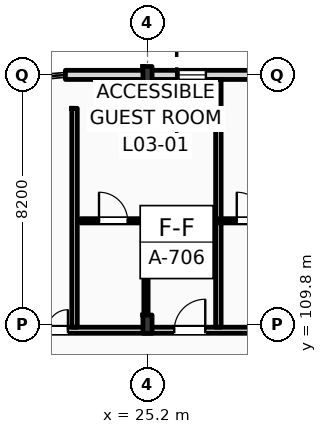
"""IFC4 building model, lengths in metres.
Left out: names, types, materials, properties, quantities, classifications, styles, units other than length and angle.
Written with IfcOpenShell. Run it as: python <this file> out.ifc"""

import sys

from ifc_helpers import new_model, si_unit, direction, frame, frame_2d, origin, origin_2d, place, context, subcontext, project, spatial, rectangle, i_section, extrude, element, fill, save


model = new_model("IFC4")
c1 = context("Model", 3, precision=1e-05, world=origin(), true_north=direction((0.0, 1.0)))
c2 = subcontext(c1, "Body", "Model", "MODEL_VIEW")
j1 = project(units=[si_unit("LENGTHUNIT", "METRE"), si_unit("PLANEANGLEUNIT", "RADIAN")], contexts=[c1])
p1 = place(None, origin())
s1 = spatial("IfcSite", under=j1, at=p1, CompositionType="ELEMENT")
p2 = place(p1, origin())
s2 = spatial("IfcBuilding", under=s1, at=p2, CompositionType="ELEMENT")
p3 = place(p2, frame((0.0, 0.0, 16.2)))
s3 = spatial("IfcBuildingStorey", under=s2, at=p3, CompositionType="ELEMENT", Elevation=16.2)
p4 = place(p3, frame((25.2, 109.8, 0.0), z_axis=(0.0, 0.0, 1.0), x_axis=(1.0, 0.0, 0.0)))
e1 = element("IfcColumn", 1, at=p4, inside=s3, PredefinedType="COLUMN", context=c2, shape_type="SweptSolid", body=[
    extrude(i_section(OverallWidth=0.3, OverallDepth=0.6, WebThickness=0.015, FlangeThickness=0.03, FilletRadius=0.027, at=origin_2d()), origin(), (0.0, 0.0, 1.0), 4.2),
])
p5 = place(p3, frame((25.2, 118.0, 0.0), z_axis=(0.0, 0.0, 1.0), x_axis=(1.0, 0.0, 0.0)))
e2 = element("IfcColumn", 2, at=p5, inside=s3, PredefinedType="COLUMN", context=c2, shape_type="SweptSolid", body=[
    extrude(i_section(OverallWidth=0.3, OverallDepth=0.55, WebThickness=0.015, FlangeThickness=0.029, FilletRadius=0.027, at=origin_2d()), origin(), (0.0, 0.0, 1.0), 4.2),
])
p6 = place(p3, frame((22.5, 118.0, 0.0), z_axis=(0.0, 0.0, 1.0), x_axis=(1.0, 0.0, 0.0)))
e3 = element("IfcWall", 3, at=p6, inside=s3, PredefinedType="STANDARD", context=c2, shape_type="SweptSolid", body=[
    extrude(rectangle(XDim=97.5, YDim=0.3, at=frame_2d((48.75, 0.0))), origin(), (0.0, 0.0, 1.0), 3.36),
])
p7 = place(p6, frame((3.721, 0.0, 0.9)))
e4 = element("IfcOpeningElement", 4, at=p7, cuts=e3, PredefinedType="OPENING", context=c2, shape_type="SweptSolid", body=[
    extrude(rectangle(XDim=0.9, YDim=1.8, at=frame_2d((0.45, 0.9))), frame((0.0, 0.16, 0.0), z_axis=(0.0, -1.0, 0.0), x_axis=(1.0, 0.0, 0.0)), (0.0, 0.0, 1.0), 0.32),
])
p8 = place(p6, frame((6.447, 0.0, 0.9)))
e5 = element("IfcOpeningElement", 5, at=p8, cuts=e3, PredefinedType="OPENING", context=c2, shape_type="SweptSolid", body=[
    extrude(rectangle(XDim=1.35, YDim=1.85, at=frame_2d((0.675, 0.925))), frame((0.0, 0.16, 0.0), z_axis=(0.0, -1.0, 0.0), x_axis=(1.0, 0.0, 0.0)), (0.0, 0.0, 1.0), 0.32),
])
p9 = place(p6, frame((11.363, 0.0, 0.9)))
e6 = element("IfcOpeningElement", 6, at=p9, cuts=e3, PredefinedType="OPENING", context=c2, shape_type="SweptSolid", body=[
    extrude(rectangle(XDim=1.5, YDim=1.9, at=frame_2d((0.75, 0.95))), frame((0.0, 0.16, 0.0), z_axis=(0.0, -1.0, 0.0), x_axis=(1.0, 0.0, 0.0)), (0.0, 0.0, 1.0), 0.32),
])
p10 = place(p6, frame((15.078, 0.0, 0.9)))
e7 = element("IfcOpeningElement", 7, at=p10, cuts=e3, PredefinedType="OPENING", context=c2, shape_type="SweptSolid", body=[
    extrude(rectangle(XDim=1.65, YDim=1.95, at=frame_2d((0.825, 0.975))), frame((0.0, 0.16, 0.0), z_axis=(0.0, -1.0, 0.0), x_axis=(1.0, 0.0, 0.0)), (0.0, 0.0, 1.0), 0.32),
])
p11 = place(p6, frame((19.395, 0.0, 0.9)))
e8 = element("IfcOpeningElement", 8, at=p11, cuts=e3, PredefinedType="OPENING", context=c2, shape_type="SweptSolid", body=[
    extrude(rectangle(XDim=1.8, YDim=2.0, at=frame_2d((0.9, 1.0))), frame((0.0, 0.16, 0.0), z_axis=(0.0, -1.0, 0.0), x_axis=(1.0, 0.0, 0.0)), (0.0, 0.0, 1.0), 0.32),
])
p12 = place(p6, frame((23.31, 0.0, 0.9)))
e9 = element("IfcOpeningElement", 9, at=p12, cuts=e3, PredefinedType="OPENING", context=c2, shape_type="SweptSolid", body=[
    extrude(rectangle(XDim=1.95, YDim=2.05, at=frame_2d((0.975, 1.025))), frame((0.0, 0.16, 0.0), z_axis=(0.0, -1.0, 0.0), x_axis=(1.0, 0.0, 0.0)), (0.0, 0.0, 1.0), 0.32),
])
p13 = place(p6, frame((28.026, 0.0, 0.9)))
e10 = element("IfcOpeningElement", 10, at=p13, cuts=e3, PredefinedType="OPENING", context=c2, shape_type="SweptSolid", body=[
    extrude(rectangle(XDim=2.1, YDim=2.1, at=frame_2d((1.05, 1.05))), frame((0.0, 0.16, 0.0), z_axis=(0.0, -1.0, 0.0), x_axis=(1.0, 0.0, 0.0)), (0.0, 0.0, 1.0), 0.32),
])
p14 = place(p6, frame((31.941, 0.0, 0.9)))
e11 = element("IfcOpeningElement", 11, at=p14, cuts=e3, PredefinedType="OPENING", context=c2, shape_type="SweptSolid", body=[
    extrude(rectangle(XDim=1.1, YDim=2.15, at=frame_2d((0.55, 1.075))), frame((0.0, 0.16, 0.0), z_axis=(0.0, -1.0, 0.0), x_axis=(1.0, 0.0, 0.0)), (0.0, 0.0, 1.0), 0.32),
])
p15 = place(p6, frame((36.657, 0.0, 0.9)))
e12 = element("IfcOpeningElement", 12, at=p15, cuts=e3, PredefinedType="OPENING", context=c2, shape_type="SweptSolid", body=[
    extrude(rectangle(XDim=2.4, YDim=2.2, at=frame_2d((1.2, 1.1))), frame((0.0, 0.16, 0.0), z_axis=(0.0, -1.0, 0.0), x_axis=(1.0, 0.0, 0.0)), (0.0, 0.0, 1.0), 0.32),
])
p16 = place(p6, frame((42.574, 0.0, 0.9)))
e13 = element("IfcOpeningElement", 13, at=p16, cuts=e3, PredefinedType="OPENING", context=c2, shape_type="SweptSolid", body=[
    extrude(rectangle(XDim=1.35, YDim=2.25, at=frame_2d((0.675, 1.125))), frame((0.0, 0.16, 0.0), z_axis=(0.0, -1.0, 0.0), x_axis=(1.0, 0.0, 0.0)), (0.0, 0.0, 1.0), 0.32),
])
p17 = place(p6, frame((45.289, 0.0, 0.9)))
e14 = element("IfcOpeningElement", 14, at=p17, cuts=e3, PredefinedType="OPENING", context=c2, shape_type="SweptSolid", body=[
    extrude(rectangle(XDim=2.7, YDim=2.28, at=frame_2d((1.35, 1.14))), frame((0.0, 0.16, 0.0), z_axis=(0.0, -1.0, 0.0), x_axis=(1.0, 0.0, 0.0)), (0.0, 0.0, 1.0), 0.32),
])
p18 = place(p6, frame((50.406, 0.0, 0.9)))
e15 = element("IfcOpeningElement", 15, at=p18, cuts=e3, PredefinedType="OPENING", context=c2, shape_type="SweptSolid", body=[
    extrude(rectangle(XDim=1.8, YDim=2.28, at=frame_2d((0.9, 1.14))), frame((0.0, 0.16, 0.0), z_axis=(0.0, -1.0, 0.0), x_axis=(1.0, 0.0, 0.0)), (0.0, 0.0, 1.0), 0.32),
])
p19 = place(p6, frame((53.922, 0.0, 0.9)))
e16 = element("IfcOpeningElement", 16, at=p19, cuts=e3, PredefinedType="OPENING", context=c2, shape_type="SweptSolid", body=[
    extrude(rectangle(XDim=1.8, YDim=2.28, at=frame_2d((0.9, 1.14))), frame((0.0, 0.16, 0.0), z_axis=(0.0, -1.0, 0.0), x_axis=(1.0, 0.0, 0.0)), (0.0, 0.0, 1.0), 0.32),
])
p20 = place(p6, frame((58.332, 0.0, 0.9)))
e17 = element("IfcOpeningElement", 17, at=p20, cuts=e3, PredefinedType="OPENING", context=c2, shape_type="SweptSolid", body=[
    extrude(rectangle(XDim=2.961, YDim=2.28, at=frame_2d((1.48, 1.14))), frame((0.0, 0.16, 0.0), z_axis=(0.0, -1.0, 0.0), x_axis=(1.0, 0.0, 0.0)), (0.0, 0.0, 1.0), 0.32),
])
p21 = place(p6, frame((62.513, 0.0, 0.9)))
e18 = element("IfcOpeningElement", 18, at=p21, cuts=e3, PredefinedType="OPENING", context=c2, shape_type="SweptSolid", body=[
    extrude(rectangle(XDim=1.8, YDim=2.28, at=frame_2d((0.9, 1.14))), frame((0.0, 0.16, 0.0), z_axis=(0.0, -1.0, 0.0), x_axis=(1.0, 0.0, 0.0)), (0.0, 0.0, 1.0), 0.32),
])
p22 = place(p6, frame((67.114, 0.0, 0.9)))
e19 = element("IfcOpeningElement", 19, at=p22, cuts=e3, PredefinedType="OPENING", context=c2, shape_type="SweptSolid", body=[
    extrude(rectangle(XDim=2.961, YDim=2.28, at=frame_2d((1.48, 1.14))), frame((0.0, 0.16, 0.0), z_axis=(0.0, -1.0, 0.0), x_axis=(1.0, 0.0, 0.0)), (0.0, 0.0, 1.0), 0.32),
])
p23 = place(p6, frame((73.695, 0.0, 0.9)))
e20 = element("IfcOpeningElement", 20, at=p23, cuts=e3, PredefinedType="OPENING", context=c2, shape_type="SweptSolid", body=[
    extrude(rectangle(XDim=1.1, YDim=2.28, at=frame_2d((0.55, 1.14))), frame((0.0, 0.16, 0.0), z_axis=(0.0, -1.0, 0.0), x_axis=(1.0, 0.0, 0.0)), (0.0, 0.0, 1.0), 0.32),
])
p24 = place(p6, frame((75.895, 0.0, 0.9)))
e21 = element("IfcOpeningElement", 21, at=p24, cuts=e3, PredefinedType="OPENING", context=c2, shape_type="SweptSolid", body=[
    extrude(rectangle(XDim=2.961, YDim=2.28, at=frame_2d((1.48, 1.14))), frame((0.0, 0.16, 0.0), z_axis=(0.0, -1.0, 0.0), x_axis=(1.0, 0.0, 0.0)), (0.0, 0.0, 1.0), 0.32),
])
p25 = place(p6, frame((81.676, 0.0, 0.9)))
e22 = element("IfcOpeningElement", 22, at=p25, cuts=e3, PredefinedType="OPENING", context=c2, shape_type="SweptSolid", body=[
    extrude(rectangle(XDim=1.8, YDim=2.28, at=frame_2d((0.9, 1.14))), frame((0.0, 0.16, 0.0), z_axis=(0.0, -1.0, 0.0), x_axis=(1.0, 0.0, 0.0)), (0.0, 0.0, 1.0), 0.32),
])
p26 = place(p6, frame((84.677, 0.0, 0.9)))
e23 = element("IfcOpeningElement", 23, at=p26, cuts=e3, PredefinedType="OPENING", context=c2, shape_type="SweptSolid", body=[
    extrude(rectangle(XDim=2.961, YDim=2.28, at=frame_2d((1.48, 1.14))), frame((0.0, 0.16, 0.0), z_axis=(0.0, -1.0, 0.0), x_axis=(1.0, 0.0, 0.0)), (0.0, 0.0, 1.0), 0.32),
])
p27 = place(p6, frame((89.999, 0.0, 0.9)))
e24 = element("IfcOpeningElement", 24, at=p27, cuts=e3, PredefinedType="OPENING", context=c2, shape_type="SweptSolid", body=[
    extrude(rectangle(XDim=1.1, YDim=1.5, at=frame_2d((0.55, 0.75))), frame((0.0, 0.16, 0.0), z_axis=(0.0, -1.0, 0.0), x_axis=(1.0, 0.0, 0.0)), (0.0, 0.0, 1.0), 0.32),
])
p28 = place(p6, frame((94.35, 0.0, 0.9)))
e25 = element("IfcOpeningElement", 25, at=p28, cuts=e3, PredefinedType="OPENING", context=c2, shape_type="SweptSolid", body=[
    extrude(rectangle(XDim=1.25, YDim=1.6, at=frame_2d((0.625, 0.8))), frame((0.0, 0.16, 0.0), z_axis=(0.0, -1.0, 0.0), x_axis=(1.0, 0.0, 0.0)), (0.0, 0.0, 1.0), 0.32),
])
p29 = place(p3, frame((10.65, 109.6, 0.0), z_axis=(0.0, 0.0, 1.0), x_axis=(1.0, 0.0, 0.0)))
e26 = element("IfcWall", 26, at=p29, inside=s3, PredefinedType="PARTITIONING", context=c2, shape_type="SweptSolid", body=[
    extrude(rectangle(XDim=109.21, YDim=0.2, at=frame_2d((54.605, 0.0))), origin(), (0.0, 0.0, 1.0), 3.36),
])
p30 = place(p29, frame((15.43, 0.0, 0.0)))
e27 = element("IfcOpeningElement", 27, at=p30, cuts=e26, PredefinedType="OPENING", context=c2, shape_type="SweptSolid", body=[
    extrude(rectangle(XDim=1.02, YDim=2.2, at=frame_2d((0.51, 1.1))), frame((0.0, 0.11, 0.0), z_axis=(0.0, -1.0, 0.0), x_axis=(1.0, 0.0, 0.0)), (0.0, 0.0, 1.0), 0.22),
])
p31 = place(p29, frame((19.537, 0.0, 0.0)))
e28 = element("IfcOpeningElement", 28, at=p31, cuts=e26, PredefinedType="OPENING", context=c2, shape_type="SweptSolid", body=[
    extrude(rectangle(XDim=1.02, YDim=2.2, at=frame_2d((0.51, 1.1))), frame((0.0, 0.11, 0.0), z_axis=(0.0, -1.0, 0.0), x_axis=(1.0, 0.0, 0.0)), (0.0, 0.0, 1.0), 0.22),
])
p32 = place(p29, frame((23.928, 0.0, 0.0)))
e29 = element("IfcOpeningElement", 29, at=p32, cuts=e26, PredefinedType="OPENING", context=c2, shape_type="SweptSolid", body=[
    extrude(rectangle(XDim=1.02, YDim=2.2, at=frame_2d((0.51, 1.1))), frame((0.0, 0.11, 0.0), z_axis=(0.0, -1.0, 0.0), x_axis=(1.0, 0.0, 0.0)), (0.0, 0.0, 1.0), 0.22),
])
p33 = place(p29, frame((26.169, 0.0, 0.0)))
e30 = element("IfcOpeningElement", 30, at=p33, cuts=e26, PredefinedType="OPENING", context=c2, shape_type="SweptSolid", body=[
    extrude(rectangle(XDim=1.02, YDim=2.2, at=frame_2d((0.51, 1.1))), frame((0.0, 0.11, 0.0), z_axis=(0.0, -1.0, 0.0), x_axis=(1.0, 0.0, 0.0)), (0.0, 0.0, 1.0), 0.22),
])
p34 = place(p29, frame((32.739, 0.0, 0.0)))
e31 = element("IfcOpeningElement", 31, at=p34, cuts=e26, PredefinedType="OPENING", context=c2, shape_type="SweptSolid", body=[
    extrude(rectangle(XDim=0.96, YDim=2.2, at=frame_2d((0.48, 1.1))), frame((0.0, 0.11, 0.0), z_axis=(0.0, -1.0, 0.0), x_axis=(1.0, 0.0, 0.0)), (0.0, 0.0, 1.0), 0.22),
])
p35 = place(p29, frame((34.98, 0.0, 0.0)))
e32 = element("IfcOpeningElement", 32, at=p35, cuts=e26, PredefinedType="OPENING", context=c2, shape_type="SweptSolid", body=[
    extrude(rectangle(XDim=0.96, YDim=2.2, at=frame_2d((0.48, 1.1))), frame((0.0, 0.11, 0.0), z_axis=(0.0, -1.0, 0.0), x_axis=(1.0, 0.0, 0.0)), (0.0, 0.0, 1.0), 0.22),
])
p36 = place(p29, frame((41.521, 0.0, 0.0)))
e33 = element("IfcOpeningElement", 33, at=p36, cuts=e26, PredefinedType="OPENING", context=c2, shape_type="SweptSolid", body=[
    extrude(rectangle(XDim=0.96, YDim=2.2, at=frame_2d((0.48, 1.1))), frame((0.0, 0.11, 0.0), z_axis=(0.0, -1.0, 0.0), x_axis=(1.0, 0.0, 0.0)), (0.0, 0.0, 1.0), 0.22),
])
p37 = place(p29, frame((43.512, 0.0, 0.0)))
e34 = element("IfcOpeningElement", 34, at=p37, cuts=e26, PredefinedType="OPENING", context=c2, shape_type="SweptSolid", body=[
    extrude(rectangle(XDim=0.96, YDim=2.2, at=frame_2d((0.48, 1.1))), frame((0.0, 0.11, 0.0), z_axis=(0.0, -1.0, 0.0), x_axis=(1.0, 0.0, 0.0)), (0.0, 0.0, 1.0), 0.22),
])
p38 = place(p29, frame((50.303, 0.0, 0.0)))
e35 = element("IfcOpeningElement", 35, at=p38, cuts=e26, PredefinedType="OPENING", context=c2, shape_type="SweptSolid", body=[
    extrude(rectangle(XDim=0.96, YDim=2.2, at=frame_2d((0.48, 1.1))), frame((0.0, 0.11, 0.0), z_axis=(0.0, -1.0, 0.0), x_axis=(1.0, 0.0, 0.0)), (0.0, 0.0, 1.0), 0.22),
])
p39 = place(p29, frame((54.944, 0.0, 0.0)))
e36 = element("IfcOpeningElement", 36, at=p39, cuts=e26, PredefinedType="OPENING", context=c2, shape_type="SweptSolid", body=[
    extrude(rectangle(XDim=0.96, YDim=2.2, at=frame_2d((0.48, 1.1))), frame((0.0, 0.11, 0.0), z_axis=(0.0, -1.0, 0.0), x_axis=(1.0, 0.0, 0.0)), (0.0, 0.0, 1.0), 0.22),
])
p40 = place(p29, frame((59.085, 0.0, 0.0)))
e37 = element("IfcOpeningElement", 37, at=p40, cuts=e26, PredefinedType="OPENING", context=c2, shape_type="SweptSolid", body=[
    extrude(rectangle(XDim=0.96, YDim=2.2, at=frame_2d((0.48, 1.1))), frame((0.0, 0.11, 0.0), z_axis=(0.0, -1.0, 0.0), x_axis=(1.0, 0.0, 0.0)), (0.0, 0.0, 1.0), 0.22),
])
p41 = place(p29, frame((63.476, 0.0, 0.0)))
e38 = element("IfcOpeningElement", 38, at=p41, cuts=e26, PredefinedType="OPENING", context=c2, shape_type="SweptSolid", body=[
    extrude(rectangle(XDim=0.96, YDim=2.2, at=frame_2d((0.48, 1.1))), frame((0.0, 0.11, 0.0), z_axis=(0.0, -1.0, 0.0), x_axis=(1.0, 0.0, 0.0)), (0.0, 0.0, 1.0), 0.22),
])
p42 = place(p29, frame((65.716, 0.0, 0.0)))
e39 = element("IfcOpeningElement", 39, at=p42, cuts=e26, PredefinedType="OPENING", context=c2, shape_type="SweptSolid", body=[
    extrude(rectangle(XDim=0.96, YDim=2.2, at=frame_2d((0.48, 1.1))), frame((0.0, 0.11, 0.0), z_axis=(0.0, -1.0, 0.0), x_axis=(1.0, 0.0, 0.0)), (0.0, 0.0, 1.0), 0.22),
])
p43 = place(p29, frame((72.257, 0.0, 0.0)))
e40 = element("IfcOpeningElement", 40, at=p43, cuts=e26, PredefinedType="OPENING", context=c2, shape_type="SweptSolid", body=[
    extrude(rectangle(XDim=0.96, YDim=2.2, at=frame_2d((0.48, 1.1))), frame((0.0, 0.11, 0.0), z_axis=(0.0, -1.0, 0.0), x_axis=(1.0, 0.0, 0.0)), (0.0, 0.0, 1.0), 0.22),
])
p44 = place(p29, frame((74.498, 0.0, 0.0)))
e41 = element("IfcOpeningElement", 41, at=p44, cuts=e26, PredefinedType="OPENING", context=c2, shape_type="SweptSolid", body=[
    extrude(rectangle(XDim=0.96, YDim=2.2, at=frame_2d((0.48, 1.1))), frame((0.0, 0.11, 0.0), z_axis=(0.0, -1.0, 0.0), x_axis=(1.0, 0.0, 0.0)), (0.0, 0.0, 1.0), 0.22),
])
p45 = place(p29, frame((81.039, 0.0, 0.0)))
e42 = element("IfcOpeningElement", 42, at=p45, cuts=e26, PredefinedType="OPENING", context=c2, shape_type="SweptSolid", body=[
    extrude(rectangle(XDim=0.96, YDim=2.2, at=frame_2d((0.48, 1.1))), frame((0.0, 0.11, 0.0), z_axis=(0.0, -1.0, 0.0), x_axis=(1.0, 0.0, 0.0)), (0.0, 0.0, 1.0), 0.22),
])
p46 = place(p29, frame((85.68, 0.0, 0.0)))
e43 = element("IfcOpeningElement", 43, at=p46, cuts=e26, PredefinedType="OPENING", context=c2, shape_type="SweptSolid", body=[
    extrude(rectangle(XDim=0.96, YDim=2.2, at=frame_2d((0.48, 1.1))), frame((0.0, 0.11, 0.0), z_axis=(0.0, -1.0, 0.0), x_axis=(1.0, 0.0, 0.0)), (0.0, 0.0, 1.0), 0.22),
])
p47 = place(p29, frame((89.82, 0.0, 0.0)))
e44 = element("IfcOpeningElement", 44, at=p47, cuts=e26, PredefinedType="OPENING", context=c2, shape_type="SweptSolid", body=[
    extrude(rectangle(XDim=0.96, YDim=2.2, at=frame_2d((0.48, 1.1))), frame((0.0, 0.11, 0.0), z_axis=(0.0, -1.0, 0.0), x_axis=(1.0, 0.0, 0.0)), (0.0, 0.0, 1.0), 0.22),
])
p48 = place(p29, frame((94.211, 0.0, 0.0)))
e45 = element("IfcOpeningElement", 45, at=p48, cuts=e26, PredefinedType="OPENING", context=c2, shape_type="SweptSolid", body=[
    extrude(rectangle(XDim=0.96, YDim=2.2, at=frame_2d((0.48, 1.1))), frame((0.0, 0.11, 0.0), z_axis=(0.0, -1.0, 0.0), x_axis=(1.0, 0.0, 0.0)), (0.0, 0.0, 1.0), 0.22),
])
p49 = place(p29, frame((98.602, 0.0, 0.0)))
e46 = element("IfcOpeningElement", 46, at=p49, cuts=e26, PredefinedType="OPENING", context=c2, shape_type="SweptSolid", body=[
    extrude(rectangle(XDim=0.96, YDim=2.2, at=frame_2d((0.48, 1.1))), frame((0.0, 0.11, 0.0), z_axis=(0.0, -1.0, 0.0), x_axis=(1.0, 0.0, 0.0)), (0.0, 0.0, 1.0), 0.22),
])
p50 = place(p29, frame((102.993, 0.0, 0.0)))
e47 = element("IfcOpeningElement", 47, at=p50, cuts=e26, PredefinedType="OPENING", context=c2, shape_type="SweptSolid", body=[
    extrude(rectangle(XDim=0.96, YDim=2.2, at=frame_2d((0.48, 1.1))), frame((0.0, 0.11, 0.0), z_axis=(0.0, -1.0, 0.0), x_axis=(1.0, 0.0, 0.0)), (0.0, 0.0, 1.0), 0.22),
])
p51 = place(p29, frame((105.269, 0.0, 0.0)))
e48 = element("IfcOpeningElement", 48, at=p51, cuts=e26, PredefinedType="OPENING", context=c2, shape_type="SweptSolid", body=[
    extrude(rectangle(XDim=0.96, YDim=2.2, at=frame_2d((0.48, 1.1))), frame((0.0, 0.11, 0.0), z_axis=(0.0, -1.0, 0.0), x_axis=(1.0, 0.0, 0.0)), (0.0, 0.0, 1.0), 0.22),
])
p52 = place(p29, frame((2.716, 0.0, 0.0)))
e49 = element("IfcOpeningElement", 49, at=p52, cuts=e26, PredefinedType="OPENING", context=c2, shape_type="SweptSolid", body=[
    extrude(rectangle(XDim=1.35, YDim=2.25, at=frame_2d((0.675, 1.125))), frame((0.0, 0.11, 0.0), z_axis=(0.0, -1.0, 0.0), x_axis=(1.0, 0.0, 0.0)), (0.0, 0.0, 1.0), 0.22),
])
p53 = place(p29, frame((6.65, 0.0, 0.0)))
e50 = element("IfcOpeningElement", 50, at=p53, cuts=e26, PredefinedType="OPENING", context=c2, shape_type="SweptSolid", body=[
    extrude(rectangle(XDim=1.35, YDim=2.25, at=frame_2d((0.675, 1.125))), frame((0.0, 0.11, 0.0), z_axis=(0.0, -1.0, 0.0), x_axis=(1.0, 0.0, 0.0)), (0.0, 0.0, 1.0), 0.22),
])
p54 = place(p29, frame((10.583, 0.0, 0.0)))
e51 = element("IfcOpeningElement", 51, at=p54, cuts=e26, PredefinedType="OPENING", context=c2, shape_type="SweptSolid", body=[
    extrude(rectangle(XDim=1.35, YDim=2.25, at=frame_2d((0.675, 1.125))), frame((0.0, 0.11, 0.0), z_axis=(0.0, -1.0, 0.0), x_axis=(1.0, 0.0, 0.0)), (0.0, 0.0, 1.0), 0.22),
])
p55 = place(p3, frame((27.531, 109.7, 0.0), z_axis=(0.0, 0.0, 1.0), x_axis=(0.0, 1.0, 0.0)))
e52 = element("IfcWall", 52, at=p55, inside=s3, PredefinedType="PARTITIONING", context=c2, shape_type="SweptSolid", body=[
    extrude(rectangle(XDim=8.15, YDim=0.18, at=frame_2d((4.075, 0.0))), origin(), (0.0, 0.0, 1.0), 3.92),
])
p56 = place(p3, frame((25.15, 109.7, 0.0), z_axis=(0.0, 0.0, 1.0), x_axis=(0.0, 1.0, 0.0)))
e53 = element("IfcWall", 53, at=p56, inside=s3, PredefinedType="PARTITIONING", context=c2, shape_type="SweptSolid", body=[
    extrude(rectangle(XDim=3.5, YDim=0.14, at=frame_2d((1.75, 0.0))), origin(), (0.0, 0.0, 1.0), 3.51),
])
p57 = place(p3, frame((23.0, 113.2, 0.0), z_axis=(0.0, 0.0, 1.0), x_axis=(1.0, 0.0, 0.0)))
e54 = element("IfcWall", 54, at=p57, inside=s3, PredefinedType="PARTITIONING", context=c2, shape_type="SweptSolid", body=[
    extrude(rectangle(XDim=2.15, YDim=0.14, at=frame_2d((1.075, 0.0))), origin(), (0.0, 0.0, 1.0), 3.92),
])
p58 = place(p57, frame((0.605, 0.0, 0.0)))
e55 = element("IfcOpeningElement", 55, at=p58, cuts=e54, PredefinedType="OPENING", context=c2, shape_type="SweptSolid", body=[
    extrude(rectangle(XDim=0.94, YDim=2.15, at=frame_2d((0.47, 1.075))), frame((0.0, 0.08, 0.0), z_axis=(0.0, -1.0, 0.0), x_axis=(1.0, 0.0, 0.0)), (0.0, 0.0, 1.0), 0.16),
])
p59 = place(p3, frame((27.531, 113.2, 0.0), z_axis=(0.0, 0.0, 1.0), x_axis=(1.0, 0.0, 0.0)))
e56 = element("IfcWall", 56, at=p59, inside=s3, PredefinedType="PARTITIONING", context=c2, shape_type="SweptSolid", body=[
    extrude(rectangle(XDim=2.15, YDim=0.14, at=frame_2d((1.075, 0.0))), origin(), (0.0, 0.0, 1.0), 3.92),
])
p60 = place(p59, frame((0.605, 0.0, 0.0)))
e57 = element("IfcOpeningElement", 57, at=p60, cuts=e56, PredefinedType="OPENING", context=c2, shape_type="SweptSolid", body=[
    extrude(rectangle(XDim=0.94, YDim=2.15, at=frame_2d((0.47, 1.075))), frame((0.0, 0.08, 0.0), z_axis=(0.0, -1.0, 0.0), x_axis=(1.0, 0.0, 0.0)), (0.0, 0.0, 1.0), 0.16),
])
p61 = place(p3, frame((22.8, 109.7, 0.0), z_axis=(0.0, 0.0, 1.0), x_axis=(0.0, 1.0, 0.0)))
e58 = element("IfcWall", 58, at=p61, inside=s3, PredefinedType="PARTITIONING", context=c2, shape_type="SweptSolid", body=[
    extrude(rectangle(XDim=7.2, YDim=0.18, at=frame_2d((3.6, 0.0))), origin(), (0.0, 0.0, 1.0), 3.92),
])
p62 = place(p7, origin())
e59 = element("IfcWindow", 59, at=p62, inside=s3, PartitioningType="DOUBLE_PANEL_VERTICAL", PredefinedType="WINDOW", context=c2, shape_type="SweptSolid", body=[
    extrude(rectangle(XDim=0.9, YDim=1.8, at=frame_2d((0.45, 0.9))), frame((0.0, 0.03, 0.0), z_axis=(0.0, -1.0, 0.0), x_axis=(1.0, 0.0, 0.0)), (0.0, 0.0, 1.0), 0.06),
])
fill(e4, e59)
p63 = place(p30, origin())
e60 = element("IfcDoor", 60, at=p63, inside=s3, OperationType="SINGLE_SWING_RIGHT", PredefinedType="DOOR", context=c2, shape_type="SweptSolid", body=[
    extrude(rectangle(XDim=1.02, YDim=2.2, at=frame_2d((0.51, 1.1))), frame((0.0, 0.025, 0.0), z_axis=(0.0, -1.0, 0.0), x_axis=(1.0, 0.0, 0.0)), (0.0, 0.0, 1.0), 0.05),
])
fill(e27, e60)
p64 = place(p58, origin())
e61 = element("IfcDoor", 61, at=p64, inside=s3, OperationType="SINGLE_SWING_LEFT", PredefinedType="DOOR", context=c2, shape_type="SweptSolid", body=[
    extrude(rectangle(XDim=0.94, YDim=2.15, at=frame_2d((0.47, 1.075))), frame((0.0, 0.025, 0.0), z_axis=(0.0, -1.0, 0.0), x_axis=(1.0, 0.0, 0.0)), (0.0, 0.0, 1.0), 0.05),
])
fill(e55, e61)
p65 = place(p60, origin())
e62 = element("IfcDoor", 62, at=p65, inside=s3, OperationType="SINGLE_SWING_LEFT", PredefinedType="DOOR", context=c2, shape_type="SweptSolid", body=[
    extrude(rectangle(XDim=0.94, YDim=2.15, at=frame_2d((0.47, 1.075))), frame((0.0, 0.025, 0.0), z_axis=(0.0, -1.0, 0.0), x_axis=(1.0, 0.0, 0.0)), (0.0, 0.0, 1.0), 0.05),
])
fill(e57, e62)
p66 = place(p54, origin())
e63 = element("IfcDoor", 63, at=p66, inside=s3, OperationType="DOUBLE_SWING_LEFT", PredefinedType="DOOR", context=c2, shape_type="SweptSolid", body=[
    extrude(rectangle(XDim=1.35, YDim=2.25, at=frame_2d((0.675, 1.125))), frame((0.0, 0.025, 0.0), z_axis=(0.0, -1.0, 0.0), x_axis=(1.0, 0.0, 0.0)), (0.0, 0.0, 1.0), 0.05),
])
fill(e51, e63)
save(model, sys.argv[1])
